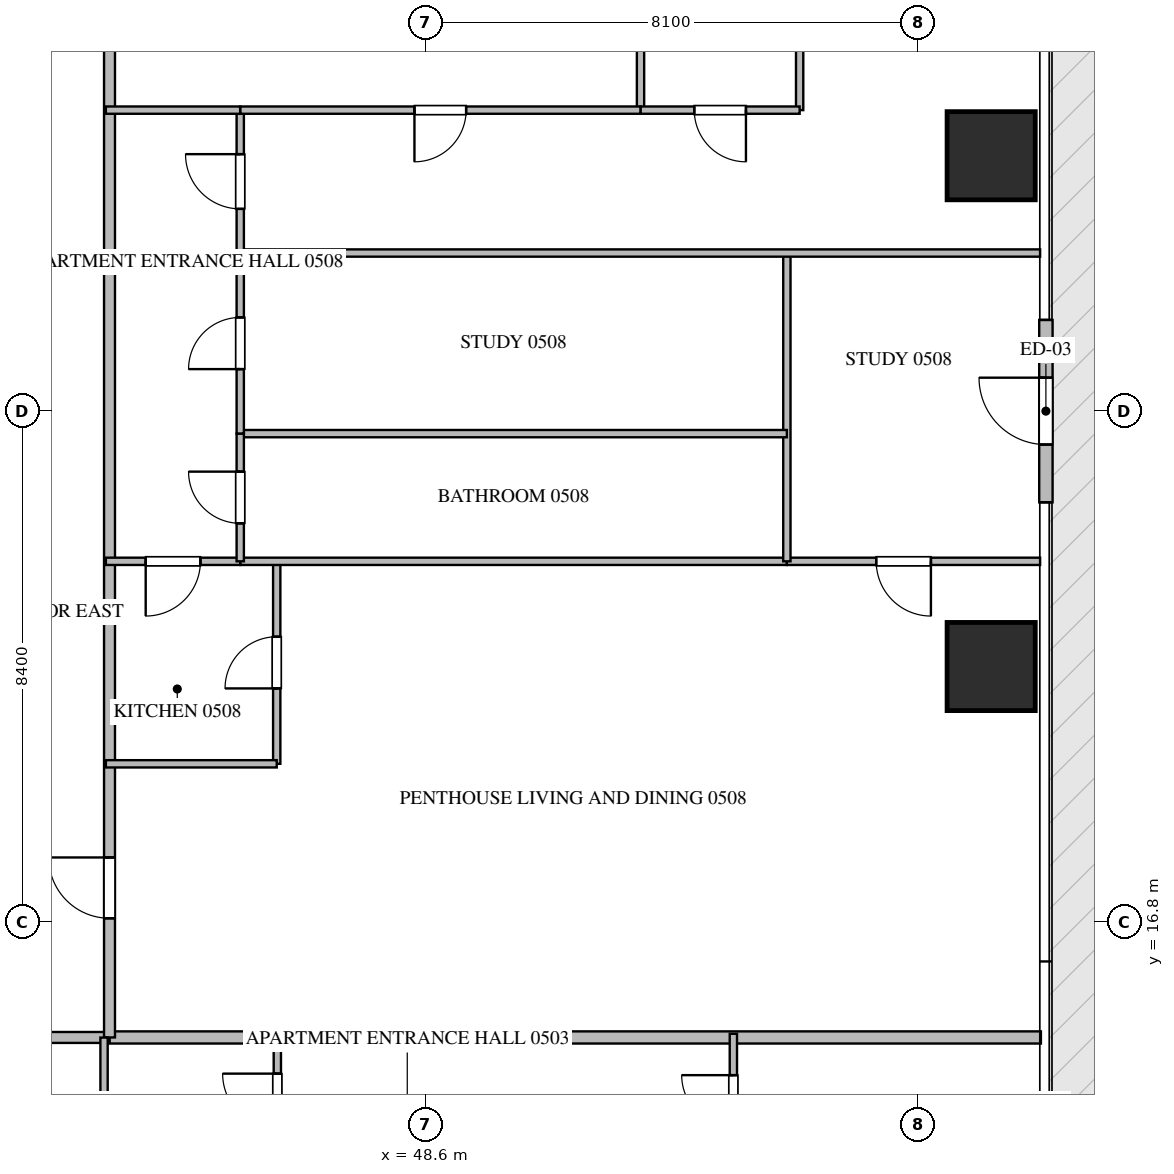
"""IFC4 building model, lengths in metres.
Left out: names, types, materials, properties, quantities, classifications, styles, units other than length and angle.
Written with IfcOpenShell. Run it as: python <this file> out.ifc"""

import sys

from ifc_helpers import new_model, si_unit, direction, frame, frame_2d, origin, origin_2d, place, context, subcontext, project, spatial, rectangle, extrude, source, transform, mapped, element, fill, save


model = new_model("IFC4")
c1 = context("Model", 3, precision=1e-05, world=origin(), true_north=direction((0.0, 1.0)))
c2 = subcontext(c1, "Body", "Model", "MODEL_VIEW")
j1 = project(units=[si_unit("LENGTHUNIT", "METRE"), si_unit("PLANEANGLEUNIT", "RADIAN")], contexts=[c1])
p1 = place(None, origin())
s1 = spatial("IfcSite", under=j1, at=p1, CompositionType="ELEMENT")
p2 = place(p1, origin())
s2 = spatial("IfcBuilding", under=s1, at=p2, CompositionType="ELEMENT")
p3 = place(p2, frame((0.0, 0.0, 26.7)))
s3 = spatial("IfcBuildingStorey", under=s2, at=p3, CompositionType="ELEMENT", Elevation=26.7)
m1 = source(origin(), c2, "Body", "SweptSolid", [
    extrude(rectangle(XDim=1.45, YDim=1.45, at=origin_2d()), origin(), (0.0, 0.0, 1.0), 3.93),
])
for number, where, z_axis, x_axis in (
    (1, (57.9, 21.0, -0.44), (0.0, 0.0, 1.0), (1.0, 0.0, 0.0)),
    (2, (57.9, 29.4, -0.44), (0.0, 0.0, 1.0), (1.0, 0.0, 0.0)),
):
    element("IfcColumn", number, at=place(p3, frame(where, z_axis=z_axis, x_axis=x_axis)), inside=s3, PredefinedType="COLUMN", context=c2, shape_type="MappedRepresentation", body=[
        mapped(m1, transform((0.0, 0.0, 0.0), scale=1.0)),
    ])
p4 = place(p3, frame((58.8, 23.7, 0.0), z_axis=(0.0, 0.0, 1.0), x_axis=(0.0, 1.0, 0.0)))
e3 = element("IfcWall", 3, at=p4, inside=s3, PredefinedType="ELEMENTEDWALL", context=c2, shape_type="SweptSolid", body=[
    extrude(rectangle(XDim=3.0, YDim=0.22, at=frame_2d((1.5, 0.0))), origin(), (0.0, 0.0, 1.0), 3.475),
])
p5 = place(p4, frame((0.95, 0.0, 0.0)))
e4 = element("IfcOpeningElement", 4, at=p5, cuts=e3, PredefinedType="OPENING", context=c2, shape_type="SweptSolid", body=[
    extrude(rectangle(XDim=1.1, YDim=2.2, at=frame_2d((0.55, 1.1))), frame((0.0, 0.12, 0.0), z_axis=(0.0, -1.0, 0.0), x_axis=(1.0, 0.0, 0.0)), (0.0, 0.0, 1.0), 0.24),
])
p6 = place(p3, frame((43.4, 14.9, 0.0), z_axis=(0.0, 0.0, 1.0), x_axis=(1.0, 0.0, 0.0)))
e5 = element("IfcWall", 5, at=p6, inside=s3, PredefinedType="PARTITIONING", context=c2, shape_type="SweptSolid", body=[
    extrude(rectangle(XDim=15.318, YDim=0.2, at=frame_2d((7.659, 0.0))), origin(), (0.0, 0.0, 1.0), 3.49),
])
p7 = place(p3, frame((21.402, 14.9, 0.0), z_axis=(0.0, 0.0, 1.0), x_axis=(1.0, 0.0, 0.0)))
e6 = element("IfcWall", 6, at=p7, inside=s3, PredefinedType="PARTITIONING", context=c2, shape_type="SweptSolid", body=[
    extrude(rectangle(XDim=21.996, YDim=0.18, at=frame_2d((10.998, 0.0))), origin(), (0.0, 0.0, 1.0), 3.49),
])
p8 = place(p7, frame((2.1, 0.0, 0.0)))
e7 = element("IfcOpeningElement", 7, at=p8, cuts=e6, PredefinedType="OPENING", context=c2, shape_type="SweptSolid", body=[
    extrude(rectangle(XDim=1.0, YDim=2.15, at=frame_2d((0.5, 1.075))), frame((0.0, 0.1, 0.0), z_axis=(0.0, -1.0, 0.0), x_axis=(1.0, 0.0, 0.0)), (0.0, 0.0, 1.0), 0.2),
])
p9 = place(p7, frame((6.719, 0.0, 0.0)))
e8 = element("IfcOpeningElement", 8, at=p9, cuts=e6, PredefinedType="OPENING", context=c2, shape_type="SweptSolid", body=[
    extrude(rectangle(XDim=1.0, YDim=2.15, at=frame_2d((0.5, 1.075))), frame((0.0, 0.1, 0.0), z_axis=(0.0, -1.0, 0.0), x_axis=(1.0, 0.0, 0.0)), (0.0, 0.0, 1.0), 0.2),
])
p10 = place(p7, frame((18.896, 0.0, 0.0)))
e9 = element("IfcOpeningElement", 9, at=p10, cuts=e6, PredefinedType="OPENING", context=c2, shape_type="SweptSolid", body=[
    extrude(rectangle(XDim=1.0, YDim=2.15, at=frame_2d((0.5, 1.075))), frame((0.0, 0.1, 0.0), z_axis=(0.0, -1.0, 0.0), x_axis=(1.0, 0.0, 0.0)), (0.0, 0.0, 1.0), 0.2),
])
p11 = place(p3, frame((43.4, 14.9, 0.0), z_axis=(0.0, 0.0, 1.0), x_axis=(0.0, 1.0, 0.0)))
e10 = element("IfcWall", 10, at=p11, inside=s3, PredefinedType="PARTITIONING", context=c2, shape_type="SweptSolid", body=[
    extrude(rectangle(XDim=20.6, YDim=0.18, at=frame_2d((10.3, 0.0))), origin(), (0.0, 0.0, 1.0), 3.49),
])
p12 = place(p11, frame((1.96, 0.0, 0.0)))
e11 = element("IfcOpeningElement", 11, at=p12, cuts=e10, PredefinedType="OPENING", context=c2, shape_type="SweptSolid", body=[
    extrude(rectangle(XDim=1.0, YDim=2.15, at=frame_2d((0.5, 1.075))), frame((0.0, 0.1, 0.0), z_axis=(0.0, -1.0, 0.0), x_axis=(1.0, 0.0, 0.0)), (0.0, 0.0, 1.0), 0.2),
])
p13 = place(p3, frame((43.31, 12.15, 0.0), z_axis=(0.0, 0.0, 1.0), x_axis=(0.0, 1.0, 0.0)))
e12 = element("IfcWall", 12, at=p13, inside=s3, PredefinedType="PARTITIONING", context=c2, shape_type="SweptSolid", body=[
    extrude(rectangle(XDim=2.748, YDim=0.12, at=frame_2d((1.374, 0.0))), origin(), (0.0, 0.0, 1.0), 3.49),
])
p14 = place(p3, frame((46.16, 12.75, 0.0), z_axis=(0.0, 0.0, 1.0), x_axis=(0.0, 1.0, 0.0)))
e13 = element("IfcWall", 13, at=p14, inside=s3, PredefinedType="PARTITIONING", context=c2, shape_type="SweptSolid", body=[
    extrude(rectangle(XDim=2.21, YDim=0.12, at=frame_2d((1.105, 0.0))), origin(), (0.0, 0.0, 1.0), 3.49),
])
p15 = place(p14, frame((0.655, 0.0, 0.0)))
e14 = element("IfcOpeningElement", 14, at=p15, cuts=e13, PredefinedType="OPENING", context=c2, shape_type="SweptSolid", body=[
    extrude(rectangle(XDim=0.9, YDim=2.1, at=frame_2d((0.45, 1.05))), frame((0.0, 0.07, 0.0), z_axis=(0.0, -1.0, 0.0), x_axis=(1.0, 0.0, 0.0)), (0.0, 0.0, 1.0), 0.14),
])
p16 = place(p3, frame((53.66, 12.75, 0.0), z_axis=(0.0, 0.0, 1.0), x_axis=(0.0, 1.0, 0.0)))
e15 = element("IfcWall", 15, at=p16, inside=s3, PredefinedType="PARTITIONING", context=c2, shape_type="SweptSolid", body=[
    extrude(rectangle(XDim=2.21, YDim=0.12, at=frame_2d((1.105, 0.0))), origin(), (0.0, 0.0, 1.0), 3.49),
])
p17 = place(p16, frame((0.68, 0.0, 0.0)))
e16 = element("IfcOpeningElement", 16, at=p17, cuts=e15, PredefinedType="OPENING", context=c2, shape_type="SweptSolid", body=[
    extrude(rectangle(XDim=0.85, YDim=2.1, at=frame_2d((0.425, 1.05))), frame((0.0, 0.07, 0.0), z_axis=(0.0, -1.0, 0.0), x_axis=(1.0, 0.0, 0.0)), (0.0, 0.0, 1.0), 0.14),
])
p18 = place(p3, frame((46.15, 19.4, 0.0), z_axis=(0.0, 0.0, 1.0), x_axis=(0.0, 1.0, 0.0)))
e17 = element("IfcWall", 17, at=p18, inside=s3, PredefinedType="PARTITIONING", context=c2, shape_type="SweptSolid", body=[
    extrude(rectangle(XDim=3.33, YDim=0.12, at=frame_2d((1.665, 0.0))), origin(), (0.0, 0.0, 1.0), 3.49),
])
p19 = place(p18, frame((1.24, 0.0, 0.0)))
e18 = element("IfcOpeningElement", 18, at=p19, cuts=e17, PredefinedType="OPENING", context=c2, shape_type="SweptSolid", body=[
    extrude(rectangle(XDim=0.85, YDim=2.1, at=frame_2d((0.425, 1.05))), frame((0.0, 0.07, 0.0), z_axis=(0.0, -1.0, 0.0), x_axis=(1.0, 0.0, 0.0)), (0.0, 0.0, 1.0), 0.14),
])
p20 = place(p3, frame((46.15, 19.4, 0.0), z_axis=(0.0, 0.0, 1.0), x_axis=(-1.0, 0.0, 0.0)))
e19 = element("IfcWall", 19, at=p20, inside=s3, PredefinedType="PARTITIONING", context=c2, shape_type="SweptSolid", body=[
    extrude(rectangle(XDim=2.81, YDim=0.12, at=frame_2d((1.405, 0.0))), origin(), (0.0, 0.0, 1.0), 3.49),
])
p21 = place(p3, frame((45.55, 22.73, 0.0), z_axis=(0.0, 0.0, 1.0), x_axis=(-1.0, 0.0, 0.0)))
e20 = element("IfcWall", 20, at=p21, inside=s3, PredefinedType="PARTITIONING", context=c2, shape_type="SweptSolid", body=[
    extrude(rectangle(XDim=2.21, YDim=0.12, at=frame_2d((1.105, 0.0))), origin(), (0.0, 0.0, 1.0), 3.49),
])
p22 = place(p21, frame((0.655, 0.0, 0.0)))
e21 = element("IfcOpeningElement", 21, at=p22, cuts=e20, PredefinedType="OPENING", context=c2, shape_type="SweptSolid", body=[
    extrude(rectangle(XDim=0.9, YDim=2.1, at=frame_2d((0.45, 1.05))), frame((0.0, 0.07, 0.0), z_axis=(0.0, -1.0, 0.0), x_axis=(1.0, 0.0, 0.0)), (0.0, 0.0, 1.0), 0.14),
])
p23 = place(p3, frame((58.705, 22.73, 0.0), z_axis=(0.0, 0.0, 1.0), x_axis=(-1.0, 0.0, 0.0)))
e22 = element("IfcWall", 22, at=p23, inside=s3, PredefinedType="PARTITIONING", context=c2, shape_type="SweptSolid", body=[
    extrude(rectangle(XDim=4.165, YDim=0.12, at=frame_2d((2.083, 0.0))), origin(), (0.0, 0.0, 1.0), 3.49),
])
p24 = place(p23, frame((1.796, 0.0, 0.0)))
e23 = element("IfcOpeningElement", 23, at=p24, cuts=e22, PredefinedType="OPENING", context=c2, shape_type="SweptSolid", body=[
    extrude(rectangle(XDim=0.9, YDim=2.1, at=frame_2d((0.45, 1.05))), frame((0.0, 0.07, 0.0), z_axis=(0.0, -1.0, 0.0), x_axis=(1.0, 0.0, 0.0)), (0.0, 0.0, 1.0), 0.14),
])
p25 = place(p3, frame((54.538, 22.73, 0.0), z_axis=(0.0, 0.0, 1.0), x_axis=(-1.0, 0.0, 0.0)))
e24 = element("IfcWall", 24, at=p25, inside=s3, PredefinedType="PARTITIONING", context=c2, shape_type="SweptSolid", body=[
    extrude(rectangle(XDim=8.986, YDim=0.12, at=frame_2d((4.493, 0.0))), origin(), (0.0, 0.0, 1.0), 3.49),
])
p26 = place(p3, frame((54.54, 22.73, 0.0), z_axis=(0.0, 0.0, 1.0), x_axis=(0.0, 1.0, 0.0)))
e25 = element("IfcWall", 25, at=p26, inside=s3, PredefinedType="PARTITIONING", context=c2, shape_type="SweptSolid", body=[
    extrude(rectangle(XDim=5.07, YDim=0.12, at=frame_2d((2.535, 0.0))), origin(), (0.0, 0.0, 1.0), 3.49),
])
p27 = place(p3, frame((58.705, 27.8, 0.0), z_axis=(0.0, 0.0, 1.0), x_axis=(-1.0, 0.0, 0.0)))
e26 = element("IfcWall", 26, at=p27, inside=s3, PredefinedType="PARTITIONING", context=c2, shape_type="SweptSolid", body=[
    extrude(rectangle(XDim=13.155, YDim=0.12, at=frame_2d((6.578, 0.0))), origin(), (0.0, 0.0, 1.0), 3.49),
])
p28 = place(p3, frame((54.54, 24.83, 0.0), z_axis=(0.0, 0.0, 1.0), x_axis=(-1.0, 0.0, 0.0)))
e27 = element("IfcWall", 27, at=p28, inside=s3, PredefinedType="PARTITIONING", context=c2, shape_type="SweptSolid", body=[
    extrude(rectangle(XDim=8.99, YDim=0.12, at=frame_2d((4.495, 0.0))), origin(), (0.0, 0.0, 1.0), 3.49),
])
p29 = place(p3, frame((45.55, 22.73, 0.0), z_axis=(0.0, 0.0, 1.0), x_axis=(0.0, 1.0, 0.0)))
e28 = element("IfcWall", 28, at=p29, inside=s3, PredefinedType="PARTITIONING", context=c2, shape_type="SweptSolid", body=[
    extrude(rectangle(XDim=2.1, YDim=0.12, at=frame_2d((1.05, 0.0))), origin(), (0.0, 0.0, 1.0), 3.49),
])
p30 = place(p29, frame((0.625, 0.0, 0.0)))
e29 = element("IfcOpeningElement", 29, at=p30, cuts=e28, PredefinedType="OPENING", context=c2, shape_type="SweptSolid", body=[
    extrude(rectangle(XDim=0.85, YDim=2.1, at=frame_2d((0.425, 1.05))), frame((0.0, 0.07, 0.0), z_axis=(0.0, -1.0, 0.0), x_axis=(1.0, 0.0, 0.0)), (0.0, 0.0, 1.0), 0.14),
])
p31 = place(p3, frame((45.55, 24.832, 0.0), z_axis=(0.0, 0.0, 1.0), x_axis=(0.0, 1.0, 0.0)))
e30 = element("IfcWall", 30, at=p31, inside=s3, PredefinedType="PARTITIONING", context=c2, shape_type="SweptSolid", body=[
    extrude(rectangle(XDim=2.968, YDim=0.12, at=frame_2d((1.484, 0.0))), origin(), (0.0, 0.0, 1.0), 3.49),
])
p32 = place(p31, frame((1.059, 0.0, 0.0)))
e31 = element("IfcOpeningElement", 31, at=p32, cuts=e30, PredefinedType="OPENING", context=c2, shape_type="SweptSolid", body=[
    extrude(rectangle(XDim=0.85, YDim=2.1, at=frame_2d((0.425, 1.05))), frame((0.0, 0.07, 0.0), z_axis=(0.0, -1.0, 0.0), x_axis=(1.0, 0.0, 0.0)), (0.0, 0.0, 1.0), 0.14),
])
p33 = place(p3, frame((45.55, 27.802, 0.0), z_axis=(0.0, 0.0, 1.0), x_axis=(0.0, 1.0, 0.0)))
e32 = element("IfcWall", 32, at=p33, inside=s3, PredefinedType="PARTITIONING", context=c2, shape_type="SweptSolid", body=[
    extrude(rectangle(XDim=2.348, YDim=0.12, at=frame_2d((1.174, 0.0))), origin(), (0.0, 0.0, 1.0), 3.49),
])
p34 = place(p33, frame((0.724, 0.0, 0.0)))
e33 = element("IfcOpeningElement", 33, at=p34, cuts=e32, PredefinedType="OPENING", context=c2, shape_type="SweptSolid", body=[
    extrude(rectangle(XDim=0.9, YDim=2.1, at=frame_2d((0.45, 1.05))), frame((0.0, 0.07, 0.0), z_axis=(0.0, -1.0, 0.0), x_axis=(1.0, 0.0, 0.0)), (0.0, 0.0, 1.0), 0.14),
])
for number, where, z_axis, x_axis in (
    (34, (54.75, 30.15, 0.0), (0.0, 0.0, 1.0), (0.0, 1.0, 0.0)),
    (35, (52.133, 30.15, 0.0), (0.0, 0.0, 1.0), (0.0, 1.0, 0.0)),
):
    element("IfcWall", number, at=place(p3, frame(where, z_axis=z_axis, x_axis=x_axis)), inside=s3, PredefinedType="PARTITIONING", context=c2, shape_type="SweptSolid", body=[
        extrude(rectangle(XDim=5.41, YDim=0.12, at=frame_2d((2.705, 0.0))), origin(), (0.0, 0.0, 1.0), 3.49),
    ])
p35 = place(p3, frame((54.75, 30.15, 0.0), z_axis=(0.0, 0.0, 1.0), x_axis=(-1.0, 0.0, 0.0)))
e36 = element("IfcWall", 36, at=p35, inside=s3, PredefinedType="PARTITIONING", context=c2, shape_type="SweptSolid", body=[
    extrude(rectangle(XDim=2.617, YDim=0.12, at=frame_2d((1.309, 0.0))), origin(), (0.0, 0.0, 1.0), 3.49),
])
p36 = place(p35, frame((0.883, 0.0, 0.0)))
e37 = element("IfcOpeningElement", 37, at=p36, cuts=e36, PredefinedType="OPENING", context=c2, shape_type="SweptSolid", body=[
    extrude(rectangle(XDim=0.85, YDim=2.1, at=frame_2d((0.425, 1.05))), frame((0.0, 0.07, 0.0), z_axis=(0.0, -1.0, 0.0), x_axis=(1.0, 0.0, 0.0)), (0.0, 0.0, 1.0), 0.14),
])
p37 = place(p3, frame((52.131, 30.15, 0.0), z_axis=(0.0, 0.0, 1.0), x_axis=(-1.0, 0.0, 0.0)))
e38 = element("IfcWall", 38, at=p37, inside=s3, PredefinedType="PARTITIONING", context=c2, shape_type="SweptSolid", body=[
    extrude(rectangle(XDim=6.581, YDim=0.12, at=frame_2d((3.291, 0.0))), origin(), (0.0, 0.0, 1.0), 3.49),
])
p38 = place(p37, frame((2.866, 0.0, 0.0)))
e39 = element("IfcOpeningElement", 39, at=p38, cuts=e38, PredefinedType="OPENING", context=c2, shape_type="SweptSolid", body=[
    extrude(rectangle(XDim=0.85, YDim=2.1, at=frame_2d((0.425, 1.05))), frame((0.0, 0.07, 0.0), z_axis=(0.0, -1.0, 0.0), x_axis=(1.0, 0.0, 0.0)), (0.0, 0.0, 1.0), 0.14),
])
p39 = place(p3, frame((45.548, 30.15, 0.0), z_axis=(0.0, 0.0, 1.0), x_axis=(-1.0, 0.0, 0.0)))
e40 = element("IfcWall", 40, at=p39, inside=s3, PredefinedType="PARTITIONING", context=c2, shape_type="SweptSolid", body=[
    extrude(rectangle(XDim=2.208, YDim=0.12, at=frame_2d((1.104, 0.0))), origin(), (0.0, 0.0, 1.0), 3.49),
])
m2 = source(origin(), c2, "Body", "SweptSolid", [
    extrude(rectangle(XDim=1.1, YDim=2.2, at=frame_2d((0.55, 1.1))), frame((0.0, 0.025, 0.0), z_axis=(0.0, -1.0, 0.0), x_axis=(1.0, 0.0, 0.0)), (0.0, 0.0, 1.0), 0.05),
])
p40 = place(p5, origin())
e41 = element("IfcDoor", 41, at=p40, inside=s3, OperationType="SINGLE_SWING_RIGHT", PredefinedType="DOOR", context=c2, shape_type="MappedRepresentation", body=[
    mapped(m2, transform((0.0, 0.0, 0.0), scale=1.0)),
])
fill(e4, e41)
m3 = source(origin(), c2, "Body", "SweptSolid", [
    extrude(rectangle(XDim=1.0, YDim=2.15, at=frame_2d((0.5, 1.075))), frame((0.0, 0.025, 0.0), z_axis=(0.0, -1.0, 0.0), x_axis=(1.0, 0.0, 0.0)), (0.0, 0.0, 1.0), 0.05),
])
p41 = place(p12, origin())
e42 = element("IfcDoor", 42, at=p41, inside=s3, OperationType="SINGLE_SWING_RIGHT", PredefinedType="DOOR", context=c2, shape_type="MappedRepresentation", body=[
    mapped(m3, transform((0.0, 0.0, 0.0), scale=1.0)),
])
fill(e11, e42)
m4 = source(origin(), c2, "Body", "SweptSolid", [
    extrude(rectangle(XDim=0.9, YDim=2.1, at=frame_2d((0.45, 1.05))), frame((0.0, 0.025, 0.0), z_axis=(0.0, -1.0, 0.0), x_axis=(1.0, 0.0, 0.0)), (0.0, 0.0, 1.0), 0.05),
])
p42 = place(p15, origin())
e43 = element("IfcDoor", 43, at=p42, inside=s3, OperationType="SINGLE_SWING_RIGHT", PredefinedType="DOOR", context=c2, shape_type="MappedRepresentation", body=[
    mapped(m4, transform((0.0, 0.0, 0.0), scale=1.0)),
])
fill(e14, e43)
m5 = source(origin(), c2, "Body", "SweptSolid", [
    extrude(rectangle(XDim=0.85, YDim=2.1, at=frame_2d((0.425, 1.05))), frame((0.0, 0.025, 0.0), z_axis=(0.0, -1.0, 0.0), x_axis=(1.0, 0.0, 0.0)), (0.0, 0.0, 1.0), 0.05),
])
p43 = place(p17, origin())
e44 = element("IfcDoor", 44, at=p43, inside=s3, OperationType="SINGLE_SWING_RIGHT", PredefinedType="DOOR", context=c2, shape_type="MappedRepresentation", body=[
    mapped(m5, transform((0.0, 0.0, 0.0), scale=1.0)),
])
fill(e16, e44)
p44 = place(p19, origin())
e45 = element("IfcDoor", 45, at=p44, inside=s3, OperationType="SINGLE_SWING_LEFT", PredefinedType="DOOR", context=c2, shape_type="MappedRepresentation", body=[
    mapped(m5, transform((0.0, 0.0, 0.0), scale=1.0)),
])
fill(e18, e45)
p45 = place(p22, origin())
e46 = element("IfcDoor", 46, at=p45, inside=s3, OperationType="SINGLE_SWING_RIGHT", PredefinedType="DOOR", context=c2, shape_type="MappedRepresentation", body=[
    mapped(m4, transform((0.0, 0.0, 0.0), scale=1.0)),
])
fill(e21, e46)
p46 = place(p24, origin())
e47 = element("IfcDoor", 47, at=p46, inside=s3, OperationType="SINGLE_SWING_LEFT", PredefinedType="DOOR", context=c2, shape_type="MappedRepresentation", body=[
    mapped(m4, transform((0.0, 0.0, 0.0), scale=1.0)),
])
fill(e23, e47)
p47 = place(p30, origin())
e48 = element("IfcDoor", 48, at=p47, inside=s3, OperationType="SINGLE_SWING_RIGHT", PredefinedType="DOOR", context=c2, shape_type="MappedRepresentation", body=[
    mapped(m5, transform((0.0, 0.0, 0.0), scale=1.0)),
])
fill(e29, e48)
p48 = place(p32, origin())
e49 = element("IfcDoor", 49, at=p48, inside=s3, OperationType="SINGLE_SWING_LEFT", PredefinedType="DOOR", context=c2, shape_type="MappedRepresentation", body=[
    mapped(m5, transform((0.0, 0.0, 0.0), scale=1.0)),
])
fill(e31, e49)
p49 = place(p34, origin())
e50 = element("IfcDoor", 50, at=p49, inside=s3, OperationType="SINGLE_SWING_RIGHT", PredefinedType="DOOR", context=c2, shape_type="MappedRepresentation", body=[
    mapped(m4, transform((0.0, 0.0, 0.0), scale=1.0)),
])
fill(e33, e50)
p50 = place(p36, origin())
e51 = element("IfcDoor", 51, at=p50, inside=s3, OperationType="SINGLE_SWING_LEFT", PredefinedType="DOOR", context=c2, shape_type="MappedRepresentation", body=[
    mapped(m5, transform((0.0, 0.0, 0.0), scale=1.0)),
])
fill(e37, e51)
p51 = place(p38, origin())
e52 = element("IfcDoor", 52, at=p51, inside=s3, OperationType="SINGLE_SWING_RIGHT", PredefinedType="DOOR", context=c2, shape_type="MappedRepresentation", body=[
    mapped(m5, transform((0.0, 0.0, 0.0), scale=1.0)),
])
fill(e39, e52)
save(model, sys.argv[1])
